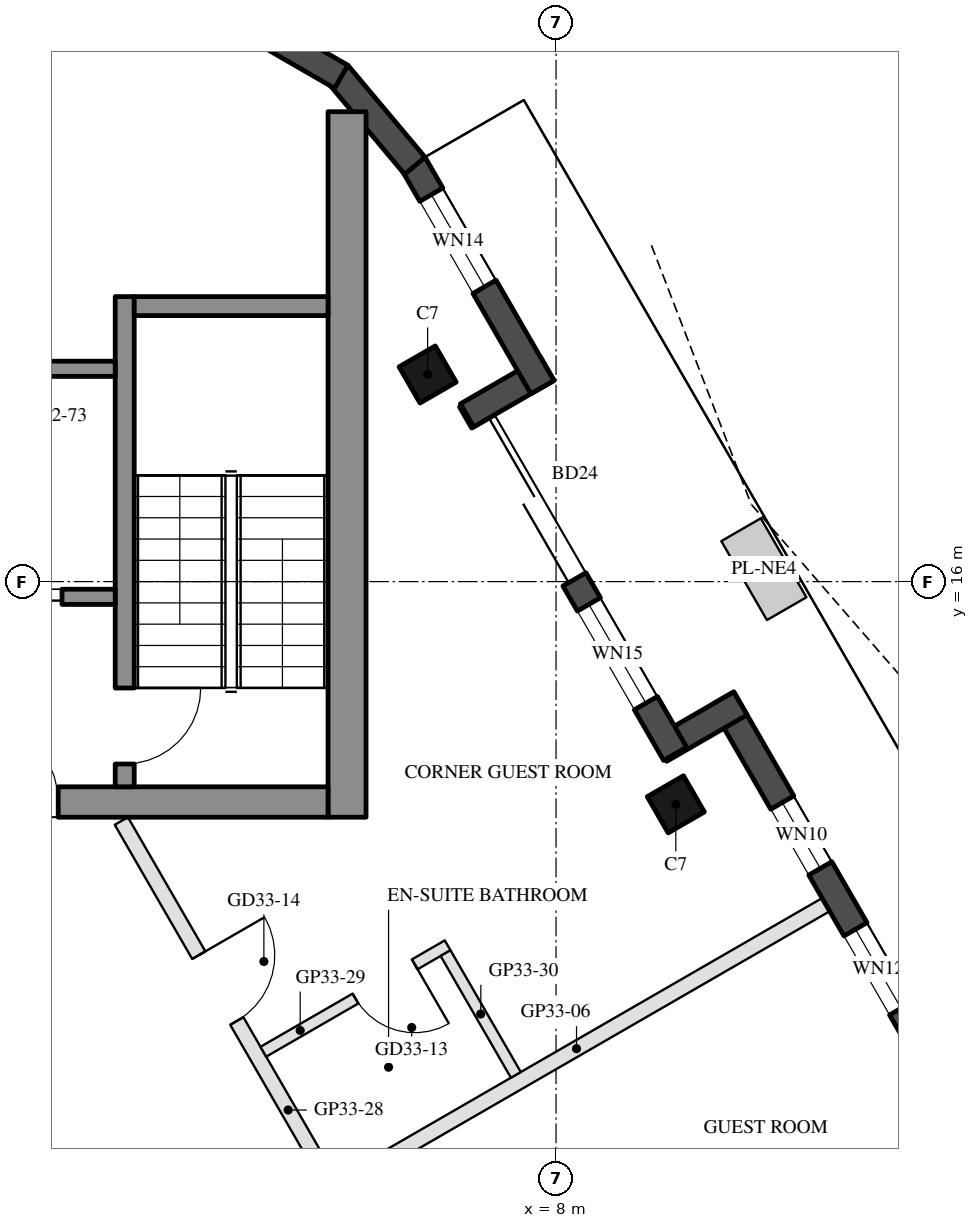
"""IFC4 building model, lengths in metres.
Left out: names, types, materials, properties, quantities, classifications, styles, units other than length and angle.
Written with IfcOpenShell. Run it as: python <this file> out.ifc"""

import sys

from ifc_helpers import new_model, si_unit, direction, frame, frame_2d, origin, origin_2d, place, context, subcontext, project, spatial, rectangle, hollow_rectangle, extrude, boolean, halfspace, element, fill, save


model = new_model("IFC4")
c1 = context("Model", 3, precision=1e-05, world=origin(), true_north=direction((0.0, 1.0)))
c2 = subcontext(c1, "Body", "Model", "MODEL_VIEW")
j1 = project(units=[si_unit("LENGTHUNIT", "METRE"), si_unit("PLANEANGLEUNIT", "RADIAN")], contexts=[c1])
p1 = place(None, origin())
s1 = spatial("IfcSite", under=j1, at=p1, CompositionType="ELEMENT")
p2 = place(p1, origin())
s2 = spatial("IfcBuilding", under=s1, at=p2, CompositionType="ELEMENT")
p3 = place(p2, frame((0.0, 0.0, 313.3)))
s3 = spatial("IfcBuildingStorey", under=s2, at=p3, CompositionType="ELEMENT", Elevation=313.3)
p4 = place(p3, frame((9.576, 13.07, 0.0), z_axis=(0.0, 0.0, 1.0), x_axis=(-0.5, 0.866025403784, 0.0)))
e1 = element("IfcColumn", 1, at=p4, inside=s3, PredefinedType="COLUMN", context=c2, shape_type="SweptSolid", body=[
    boolean("DIFFERENCE", extrude(hollow_rectangle(XDim=0.55, YDim=0.55, WallThickness=0.025, at=origin_2d()), origin(), (0.0, 0.0, 1.0), 3.7), halfspace(frame((0.0, 0.0, 0.034), z_axis=(0.0, 0.0, 1.0), x_axis=(1.0, 0.0, 0.0)), True)),
])
p5 = place(p3, frame((6.31, 18.725, 0.0), z_axis=(0.0, 0.0, 1.0), x_axis=(-0.5, 0.866025403784, 0.0)))
e2 = element("IfcColumn", 2, at=p5, inside=s3, PredefinedType="COLUMN", context=c2, shape_type="SweptSolid", body=[
    boolean("DIFFERENCE", extrude(hollow_rectangle(XDim=0.55, YDim=0.55, WallThickness=0.025, at=origin_2d()), origin(), (0.0, 0.0, 1.0), 3.7), halfspace(frame((0.0, 0.0, 0.04), z_axis=(0.0, 0.0, 1.0), x_axis=(1.0, 0.0, 0.0)), True)),
])
p6 = place(p3, frame((14.352, 7.247, 0.0), z_axis=(0.0, 0.0, 1.0), x_axis=(-0.499993893925, 0.8660289291, 0.0)))
e3 = element("IfcWall", 3, at=p6, inside=s3, PredefinedType="SOLIDWALL", context=c2, shape_type="SweptSolid", body=[
    extrude(rectangle(XDim=8.331, YDim=0.35, at=frame_2d((4.165, 0.0))), origin(), (0.0, 0.0, 1.0), 3.55),
])
p7 = place(p6, frame((1.525, 0.0, 0.0)))
e4 = element("IfcOpeningElement", 4, at=p7, cuts=e3, PredefinedType="OPENING", context=c2, shape_type="SweptSolid", body=[
    extrude(rectangle(XDim=1.8, YDim=2.4, at=frame_2d((0.9, 1.2))), frame((0.0, 0.185, 0.0), z_axis=(0.0, -1.0, 0.0), x_axis=(1.0, 0.0, 0.0)), (0.0, 0.0, 1.0), 0.37),
])
p8 = place(p6, frame((3.625, 0.0, 0.3)))
e5 = element("IfcOpeningElement", 5, at=p8, cuts=e3, PredefinedType="OPENING", context=c2, shape_type="SweptSolid", body=[
    extrude(rectangle(XDim=1.2, YDim=2.65, at=frame_2d((0.6, 1.325))), frame((0.0, 0.185, 0.0), z_axis=(0.0, -1.0, 0.0), x_axis=(1.0, 0.0, 0.0)), (0.0, 0.0, 1.0), 0.37),
])
p9 = place(p6, frame((5.75, 0.0, 0.3)))
e6 = element("IfcOpeningElement", 6, at=p9, cuts=e3, PredefinedType="OPENING", context=c2, shape_type="SweptSolid", body=[
    extrude(rectangle(XDim=1.0, YDim=2.65, at=frame_2d((0.5, 1.325))), frame((0.0, 0.185, 0.0), z_axis=(0.0, -1.0, 0.0), x_axis=(1.0, 0.0, 0.0)), (0.0, 0.0, 1.0), 0.37),
])
p10 = place(p3, frame((10.426, 14.397, 0.0), z_axis=(0.0, 0.0, 1.0), x_axis=(-0.866005645448, -0.500034220881, 0.0)))
e7 = element("IfcWall", 7, at=p10, inside=s3, PredefinedType="SOLIDWALL", context=c2, shape_type="SweptSolid", body=[
    extrude(rectangle(XDim=1.22, YDim=0.35, at=frame_2d((0.61, 0.0))), origin(), (0.0, 0.0, 1.0), 3.55),
])
p11 = place(p3, frame((9.567, 13.734, 0.0), z_axis=(0.0, 0.0, 1.0), x_axis=(-0.499996591357, 0.866027371756, 0.0)))
e8 = element("IfcWall", 8, at=p11, inside=s3, PredefinedType="SOLIDWALL", context=c2, shape_type="SweptSolid", body=[
    extrude(rectangle(XDim=5.371, YDim=0.35, at=frame_2d((2.685, 0.0))), origin(), (0.0, 0.0, 1.0), 3.55),
])
p12 = place(p11, frame((2.65, 0.0, 0.0)))
e9 = element("IfcOpeningElement", 9, at=p12, cuts=e8, PredefinedType="OPENING", context=c2, shape_type="SweptSolid", body=[
    extrude(rectangle(XDim=2.4, YDim=2.4, at=frame_2d((1.2, 1.2))), frame((0.0, 0.185, 0.0), z_axis=(0.0, -1.0, 0.0), x_axis=(1.0, 0.0, 0.0)), (0.0, 0.0, 1.0), 0.37),
])
p13 = place(p11, frame((0.77, 0.0, 0.3)))
e10 = element("IfcOpeningElement", 10, at=p13, cuts=e8, PredefinedType="OPENING", context=c2, shape_type="SweptSolid", body=[
    extrude(rectangle(XDim=1.5, YDim=2.65, at=frame_2d((0.75, 1.325))), frame((0.0, 0.185, 0.0), z_axis=(0.0, -1.0, 0.0), x_axis=(1.0, 0.0, 0.0)), (0.0, 0.0, 1.0), 0.37),
])
p14 = place(p3, frame((6.829, 18.188, 0.0), z_axis=(0.0, 0.0, 1.0), x_axis=(0.866042269935, 0.499970785833, 0.0)))
e11 = element("IfcWall", 11, at=p14, inside=s3, PredefinedType="SOLIDWALL", context=c2, shape_type="SweptSolid", body=[
    extrude(rectangle(XDim=1.22, YDim=0.35, at=frame_2d((0.61, 0.0))), origin(), (0.0, 0.0, 1.0), 3.55),
])
p15 = place(p3, frame((7.821, 18.558, 0.0), z_axis=(0.0, 0.0, 1.0), x_axis=(-0.500000656212, 0.86602502492, 0.0)))
e12 = element("IfcWall", 12, at=p15, inside=s3, PredefinedType="SOLIDWALL", context=c2, shape_type="SweptSolid", body=[
    extrude(rectangle(XDim=3.393, YDim=0.35, at=frame_2d((1.697, 0.0))), origin(), (0.0, 0.0, 1.0), 3.55),
])
p16 = place(p15, frame((1.525, 0.0, 0.3)))
e13 = element("IfcOpeningElement", 13, at=p16, cuts=e12, PredefinedType="OPENING", context=c2, shape_type="SweptSolid", body=[
    extrude(rectangle(XDim=1.4, YDim=2.65, at=frame_2d((0.7, 1.325))), frame((0.0, 0.185, 0.0), z_axis=(0.0, -1.0, 0.0), x_axis=(1.0, 0.0, 0.0)), (0.0, 0.0, 1.0), 0.37),
])
for number, where, z_axis, x_axis in (
    (14, (6.142, 21.472, 0.0), (0.0, 0.0, 1.0), (-0.643, 0.766, 0.0)),
    (15, (5.174, 22.642, 0.0), (0.0, 0.0, 1.0), (-0.866, 0.5, 0.0)),
):
    element("IfcWall", number, at=place(p3, frame(where, z_axis=z_axis, x_axis=x_axis)), inside=s3, PredefinedType="SOLIDWALL", context=c2, shape_type="SweptSolid", body=[
        extrude(rectangle(XDim=1.579, YDim=0.35, at=frame_2d((0.79, 0.0))), origin(), (0.0, 0.0, 1.0), 3.55),
    ])
p17 = place(p3, frame((5.25, 12.9, 0.0), z_axis=(0.0, 0.0, 1.0), x_axis=(0.0, 1.0, 0.0)))
e16 = element("IfcWall", 16, at=p17, inside=s3, PredefinedType="SHEAR", context=c2, shape_type="SweptSolid", body=[
    extrude(rectangle(XDim=9.283, YDim=0.5, at=frame_2d((4.641, 0.0))), origin(), (0.0, 0.0, 1.0), 3.5),
])
p18 = place(p3, frame((5.0, 13.1, 0.0), z_axis=(0.0, 0.0, 1.0), x_axis=(-1.0, 0.0, 0.0)))
e17 = element("IfcWall", 17, at=p18, inside=s3, PredefinedType="SHEAR", context=c2, shape_type="SweptSolid", body=[
    extrude(rectangle(XDim=10.0, YDim=0.4, at=frame_2d((5.0, 0.0))), origin(), (0.0, 0.0, 1.0), 3.5),
])
p19 = place(p18, frame((3.55, 0.0, 0.0)))
e18 = element("IfcOpeningElement", 18, at=p19, cuts=e17, PredefinedType="OPENING", context=c2, shape_type="SweptSolid", body=[
    extrude(rectangle(XDim=1.1, YDim=2.1, at=frame_2d((0.55, 1.05))), frame((0.0, 0.21, 0.0), z_axis=(0.0, -1.0, 0.0), x_axis=(1.0, 0.0, 0.0)), (0.0, 0.0, 1.0), 0.42),
])
p20 = place(p18, frame((5.85, 0.0, 0.0)))
e19 = element("IfcOpeningElement", 19, at=p20, cuts=e17, PredefinedType="OPENING", context=c2, shape_type="SweptSolid", body=[
    extrude(rectangle(XDim=1.4, YDim=2.1, at=frame_2d((0.7, 1.05))), frame((0.0, 0.21, 0.0), z_axis=(0.0, -1.0, 0.0), x_axis=(1.0, 0.0, 0.0)), (0.0, 0.0, 1.0), 0.42),
])
p21 = place(p3, frame((2.325, 13.3, 0.0), z_axis=(0.0, 0.0, 1.0), x_axis=(0.0, 1.0, 0.0)))
e20 = element("IfcWall", 20, at=p21, inside=s3, PredefinedType="SHEAR", context=c2, shape_type="SweptSolid", body=[
    extrude(rectangle(XDim=6.45, YDim=0.25, at=frame_2d((3.225, 0.0))), origin(), (0.0, 0.0, 1.0), 3.5),
])
p22 = place(p21, frame((0.3, 0.0, 0.0)))
e21 = element("IfcOpeningElement", 21, at=p22, cuts=e20, PredefinedType="OPENING", context=c2, shape_type="SweptSolid", body=[
    extrude(rectangle(XDim=1.0, YDim=2.1, at=frame_2d((0.5, 1.05))), frame((0.0, 0.135, 0.0), z_axis=(0.0, -1.0, 0.0), x_axis=(1.0, 0.0, 0.0)), (0.0, 0.0, 1.0), 0.27),
])
p23 = place(p3, frame((5.0, 19.625, 0.0), z_axis=(0.0, 0.0, 1.0), x_axis=(-1.0, 0.0, 0.0)))
e22 = element("IfcWall", 22, at=p23, inside=s3, PredefinedType="SHEAR", context=c2, shape_type="SweptSolid", body=[
    extrude(rectangle(XDim=2.55, YDim=0.25, at=frame_2d((1.275, 0.0))), origin(), (0.0, 0.0, 1.0), 3.5),
])
p24 = place(p3, frame((2.2, 18.8, 0.0), z_axis=(0.0, 0.0, 1.0), x_axis=(-1.0, 0.0, 0.0)))
e23 = element("IfcWall", 23, at=p24, inside=s3, PredefinedType="SHEAR", context=c2, shape_type="SweptSolid", body=[
    extrude(rectangle(XDim=2.8, YDim=0.2, at=frame_2d((1.4, 0.0))), origin(), (0.0, 0.0, 1.0), 3.5),
])
p25 = place(p3, frame((2.2, 15.8, 0.0), z_axis=(0.0, 0.0, 1.0), x_axis=(-1.0, 0.0, 0.0)))
e24 = element("IfcWall", 24, at=p25, inside=s3, PredefinedType="SHEAR", context=c2, shape_type="SweptSolid", body=[
    extrude(rectangle(XDim=2.8, YDim=0.2, at=frame_2d((1.4, 0.0))), origin(), (0.0, 0.0, 1.0), 3.5),
])
p26 = place(p25, frame((0.7, 0.0, 0.0)))
e25 = element("IfcOpeningElement", 25, at=p26, cuts=e24, PredefinedType="OPENING", context=c2, shape_type="SweptSolid", body=[
    extrude(rectangle(XDim=1.2, YDim=2.1, at=frame_2d((0.6, 1.05))), frame((0.0, 0.11, 0.0), z_axis=(0.0, -1.0, 0.0), x_axis=(1.0, 0.0, 0.0)), (0.0, 0.0, 1.0), 0.22),
])
p27 = place(p3, frame((11.55, 11.749, 0.0), z_axis=(0.0, 0.0, 1.0), x_axis=(-0.866019793702, -0.500009716822, 0.0)))
e26 = element("IfcWall", 26, at=p27, inside=s3, PredefinedType="PARTITIONING", context=c2, shape_type="SweptSolid", body=[
    extrude(rectangle(XDim=7.577, YDim=0.2, at=frame_2d((3.789, 0.0))), origin(), (0.0, 0.0, 1.0), 3.16),
])
p28 = place(p3, frame((2.281, 12.85, 0.0), z_axis=(0.0, 0.0, 1.0), x_axis=(0.500004836318, -0.866022611517, 0.0)))
e27 = element("IfcWall", 27, at=p28, inside=s3, PredefinedType="PARTITIONING", context=c2, shape_type="SweptSolid", body=[
    extrude(rectangle(XDim=5.488, YDim=0.2, at=frame_2d((2.744, 0.0))), origin(), (0.0, 0.0, 1.0), 3.1),
])
p29 = place(p28, frame((2.038, 0.0, 0.0)))
e28 = element("IfcOpeningElement", 28, at=p29, cuts=e27, PredefinedType="OPENING", context=c2, shape_type="SweptSolid", body=[
    extrude(rectangle(XDim=1.0, YDim=2.1, at=frame_2d((0.5, 1.05))), frame((0.0, 0.11, 0.0), z_axis=(0.0, -1.0, 0.0), x_axis=(1.0, 0.0, 0.0)), (0.0, 0.0, 1.0), 0.22),
])
p30 = place(p3, frame((6.573, 11.214, 0.0), z_axis=(0.0, 0.0, 1.0), x_axis=(-0.866034573852, -0.49998411664, 0.0)))
e29 = element("IfcWall", 29, at=p30, inside=s3, PredefinedType="PARTITIONING", context=c2, shape_type="SweptSolid", body=[
    extrude(rectangle(XDim=2.8, YDim=0.15, at=frame_2d((1.4, 0.0))), origin(), (0.0, 0.0, 1.0), 3.1),
])
p31 = place(p30, frame((0.5, 0.0, 0.0)))
e30 = element("IfcOpeningElement", 30, at=p31, cuts=e29, PredefinedType="OPENING", context=c2, shape_type="SweptSolid", body=[
    extrude(rectangle(XDim=0.9, YDim=2.1, at=frame_2d((0.45, 1.05))), frame((0.0, 0.085, 0.0), z_axis=(0.0, -1.0, 0.0), x_axis=(1.0, 0.0, 0.0)), (0.0, 0.0, 1.0), 0.17),
])
p32 = place(p3, frame((7.471, 9.51, 0.0), z_axis=(0.0, 0.0, 1.0), x_axis=(-0.499985172903, 0.866033964044, 0.0)))
e31 = element("IfcWall", 31, at=p32, inside=s3, PredefinedType="PARTITIONING", context=c2, shape_type="SweptSolid", body=[
    extrude(rectangle(XDim=1.85, YDim=0.15, at=frame_2d((0.925, 0.0))), origin(), (0.0, 0.0, 1.0), 3.55),
])
p33 = place(p8, origin())
e32 = element("IfcWindow", 32, at=p33, inside=s3, PartitioningType="SINGLE_PANEL", PredefinedType="WINDOW", context=c2, shape_type="SweptSolid", body=[
    extrude(rectangle(XDim=1.2, YDim=2.65, at=frame_2d((0.6, 1.325))), frame((0.0, 0.03, 0.0), z_axis=(0.0, -1.0, 0.0), x_axis=(1.0, 0.0, 0.0)), (0.0, 0.0, 1.0), 0.06),
])
fill(e5, e32)
p34 = place(p9, origin())
e33 = element("IfcWindow", 33, at=p34, inside=s3, PartitioningType="SINGLE_PANEL", PredefinedType="WINDOW", context=c2, shape_type="SweptSolid", body=[
    extrude(rectangle(XDim=1.0, YDim=2.65, at=frame_2d((0.5, 1.325))), frame((0.0, 0.03, 0.0), z_axis=(0.0, -1.0, 0.0), x_axis=(1.0, 0.0, 0.0)), (0.0, 0.0, 1.0), 0.06),
])
fill(e6, e33)
p35 = place(p12, frame((2.4, 0.0, 0.0), z_axis=(0.0, 0.0, 1.0), x_axis=(-1.0, 0.0, 0.0)))
e34 = element("IfcDoor", 34, at=p35, inside=s3, OperationType="SLIDING_TO_LEFT", PredefinedType="DOOR", context=c2, shape_type="SweptSolid", body=[
    extrude(rectangle(XDim=2.4, YDim=2.4, at=frame_2d((1.2, 1.2))), frame((0.0, 0.025, 0.0), z_axis=(0.0, -1.0, 0.0), x_axis=(1.0, 0.0, 0.0)), (0.0, 0.0, 1.0), 0.05),
])
fill(e9, e34)
p36 = place(p13, origin())
e35 = element("IfcWindow", 35, at=p36, inside=s3, PartitioningType="SINGLE_PANEL", PredefinedType="WINDOW", context=c2, shape_type="SweptSolid", body=[
    extrude(rectangle(XDim=1.5, YDim=2.65, at=frame_2d((0.75, 1.325))), frame((0.0, 0.03, 0.0), z_axis=(0.0, -1.0, 0.0), x_axis=(1.0, 0.0, 0.0)), (0.0, 0.0, 1.0), 0.06),
])
fill(e10, e35)
p37 = place(p16, origin())
e36 = element("IfcWindow", 36, at=p37, inside=s3, PartitioningType="SINGLE_PANEL", PredefinedType="WINDOW", context=c2, shape_type="SweptSolid", body=[
    extrude(rectangle(XDim=1.4, YDim=2.65, at=frame_2d((0.7, 1.325))), frame((0.0, 0.03, 0.0), z_axis=(0.0, -1.0, 0.0), x_axis=(1.0, 0.0, 0.0)), (0.0, 0.0, 1.0), 0.06),
])
fill(e13, e36)
p38 = place(p26, origin())
e37 = element("IfcDoor", 37, at=p38, inside=s3, OperationType="DOUBLE_DOOR_SLIDING", PredefinedType="DOOR", context=c2, shape_type="SweptSolid", body=[
    extrude(rectangle(XDim=1.2, YDim=2.1, at=frame_2d((0.6, 1.05))), frame((0.0, 0.025, 0.0), z_axis=(0.0, -1.0, 0.0), x_axis=(1.0, 0.0, 0.0)), (0.0, 0.0, 1.0), 0.05),
])
fill(e25, e37)
p39 = place(p19, frame((1.1, 0.0, 0.0), z_axis=(0.0, 0.0, 1.0), x_axis=(-1.0, 0.0, 0.0)))
e38 = element("IfcDoor", 38, at=p39, inside=s3, OperationType="SINGLE_SWING_LEFT", PredefinedType="DOOR", context=c2, shape_type="SweptSolid", body=[
    extrude(rectangle(XDim=1.1, YDim=2.1, at=frame_2d((0.55, 1.05))), frame((0.0, 0.025, 0.0), z_axis=(0.0, -1.0, 0.0), x_axis=(1.0, 0.0, 0.0)), (0.0, 0.0, 1.0), 0.05),
])
fill(e18, e38)
p40 = place(p22, frame((1.0, 0.0, 0.0), z_axis=(0.0, 0.0, 1.0), x_axis=(-1.0, 0.0, 0.0)))
e39 = element("IfcDoor", 39, at=p40, inside=s3, OperationType="SINGLE_SWING_LEFT", PredefinedType="DOOR", context=c2, shape_type="SweptSolid", body=[
    extrude(rectangle(XDim=1.0, YDim=2.1, at=frame_2d((0.5, 1.05))), frame((0.0, 0.025, 0.0), z_axis=(0.0, -1.0, 0.0), x_axis=(1.0, 0.0, 0.0)), (0.0, 0.0, 1.0), 0.05),
])
fill(e21, e39)
p41 = place(p31, origin())
e40 = element("IfcDoor", 40, at=p41, inside=s3, OperationType="SINGLE_SWING_LEFT", PredefinedType="DOOR", context=c2, shape_type="SweptSolid", body=[
    extrude(rectangle(XDim=0.9, YDim=2.1, at=frame_2d((0.45, 1.05))), frame((0.0, 0.025, 0.0), z_axis=(0.0, -1.0, 0.0), x_axis=(1.0, 0.0, 0.0)), (0.0, 0.0, 1.0), 0.05),
])
fill(e30, e40)
p42 = place(p29, origin())
e41 = element("IfcDoor", 41, at=p42, inside=s3, OperationType="SINGLE_SWING_LEFT", PredefinedType="DOOR", context=c2, shape_type="SweptSolid", body=[
    extrude(rectangle(XDim=1.0, YDim=2.1, at=frame_2d((0.5, 1.05))), frame((0.0, 0.025, 0.0), z_axis=(0.0, -1.0, 0.0), x_axis=(1.0, 0.0, 0.0)), (0.0, 0.0, 1.0), 0.05),
])
fill(e28, e41)
save(model, sys.argv[1])
